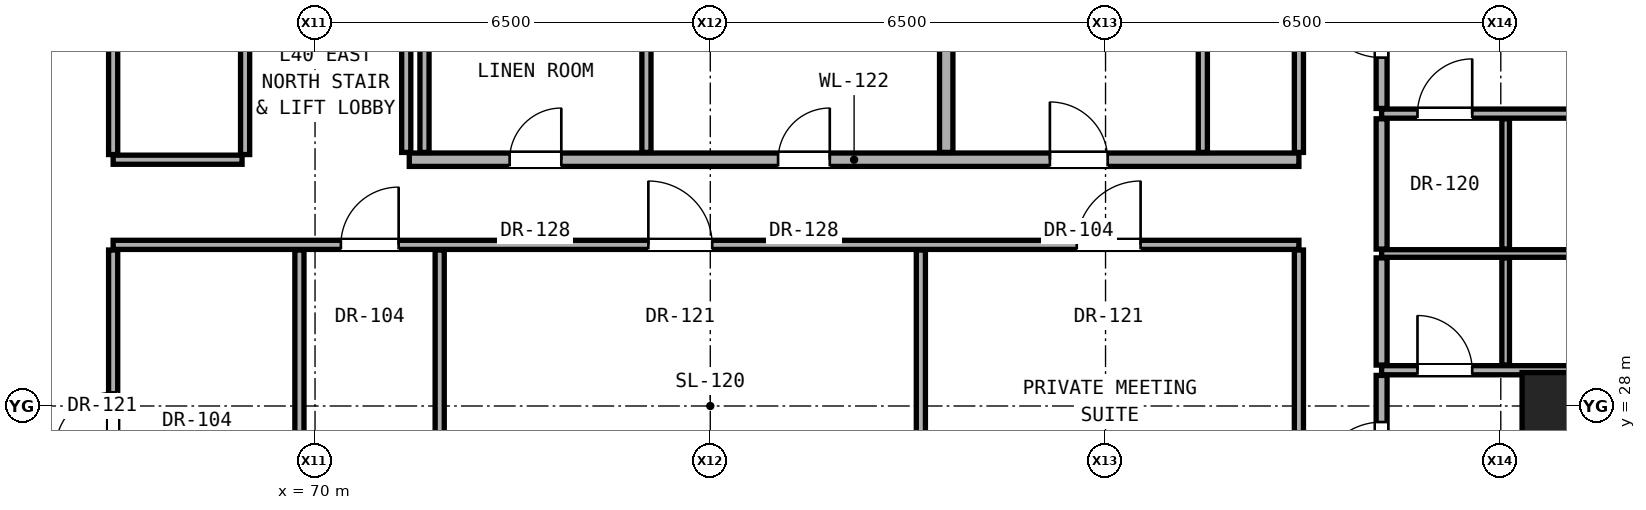
"""IFC4 building model, lengths in metres.
Left out: names, types, materials, properties, quantities, classifications, styles, units other than length and angle.
Written with IfcOpenShell. Run it as: python <this file> out.ifc"""

import sys

from ifc_helpers import new_model, si_unit, direction, frame, frame_2d, origin, origin_2d, place, context, subcontext, project, spatial, rectangle, hollow_rectangle, extrude, element, fill, save


model = new_model("IFC4")
c1 = context("Model", 3, precision=1e-05, world=origin(), true_north=direction((0.0, 1.0)))
c2 = subcontext(c1, "Body", "Model", "MODEL_VIEW")
j1 = project(units=[si_unit("LENGTHUNIT", "METRE"), si_unit("PLANEANGLEUNIT", "RADIAN")], contexts=[c1])
p1 = place(None, origin())
s1 = spatial("IfcSite", under=j1, at=p1, CompositionType="ELEMENT")
p2 = place(p1, origin())
s2 = spatial("IfcBuilding", under=s1, at=p2, CompositionType="ELEMENT")
p3 = place(p2, frame((0.0, 0.0, 141.2)))
s3 = spatial("IfcBuildingStorey", under=s2, at=p3, CompositionType="ELEMENT", Elevation=141.2)
p4 = place(p3, frame((90.4, 28.0, 0.0), z_axis=(0.0, 0.0, 1.0), x_axis=(1.0, 0.0, 0.0)))
e1 = element("IfcColumn", 1, at=p4, inside=s3, PredefinedType="COLUMN", context=c2, shape_type="SweptSolid", body=[
    extrude(hollow_rectangle(XDim=1.1, YDim=1.1, WallThickness=0.06, at=origin_2d()), origin(), (0.0, 0.0, 1.0), 3.3),
])
p5 = place(p3, frame((87.54, 28.588, 0.0), z_axis=(0.0, 0.0, 1.0), x_axis=(1.0, 0.0, 0.0)))
e2 = element("IfcWall", 2, at=p5, inside=s3, PredefinedType="PARTITIONING", context=c2, shape_type="SweptSolid", body=[
    extrude(rectangle(XDim=7.471, YDim=0.15, at=frame_2d((3.735, 0.0))), origin(), (0.0, 0.0, 1.0), 2.299),
])
p6 = place(p5, frame((4.26, 0.0, 0.0)))
e3 = element("IfcOpeningElement", 3, at=p6, cuts=e2, PredefinedType="OPENING", context=c2, shape_type="SweptSolid", body=[
    extrude(rectangle(XDim=0.95, YDim=2.15, at=frame_2d((0.475, 1.075))), frame((0.0, 0.085, 0.0), z_axis=(0.0, -1.0, 0.0), x_axis=(1.0, 0.0, 0.0)), (0.0, 0.0, 1.0), 0.17),
])
p7 = place(p5, frame((0.59, 0.0, 0.0)))
e4 = element("IfcOpeningElement", 4, at=p7, cuts=e2, PredefinedType="OPENING", context=c2, shape_type="SweptSolid", body=[
    extrude(rectangle(XDim=0.9, YDim=2.1, at=frame_2d((0.45, 1.05))), frame((0.0, 0.085, 0.0), z_axis=(0.0, -1.0, 0.0), x_axis=(1.0, 0.0, 0.0)), (0.0, 0.0, 1.0), 0.17),
])
p8 = place(p3, frame((66.68, 30.65, 0.0), z_axis=(0.0, 0.0, 1.0), x_axis=(1.0, 0.0, 0.0)))
e5 = element("IfcWall", 5, at=p8, inside=s3, PredefinedType="PARTITIONING", context=c2, shape_type="SweptSolid", body=[
    extrude(rectangle(XDim=19.5, YDim=0.15, at=frame_2d((9.75, 0.0))), origin(), (0.0, 0.0, 1.0), 2.216),
])
p9 = place(p8, frame((3.745, 0.0, 0.0)))
e6 = element("IfcOpeningElement", 6, at=p9, cuts=e5, PredefinedType="OPENING", context=c2, shape_type="SweptSolid", body=[
    extrude(rectangle(XDim=0.95, YDim=2.15, at=frame_2d((0.475, 1.075))), frame((0.0, 0.085, 0.0), z_axis=(0.0, -1.0, 0.0), x_axis=(1.0, 0.0, 0.0)), (0.0, 0.0, 1.0), 0.17),
])
p10 = place(p8, frame((8.802, 0.0, 0.0)))
e7 = element("IfcOpeningElement", 7, at=p10, cuts=e5, PredefinedType="OPENING", context=c2, shape_type="SweptSolid", body=[
    extrude(rectangle(XDim=1.05, YDim=2.2, at=frame_2d((0.525, 1.1))), frame((0.0, 0.085, 0.0), z_axis=(0.0, -1.0, 0.0), x_axis=(1.0, 0.0, 0.0)), (0.0, 0.0, 1.0), 0.17),
])
p11 = place(p8, frame((15.846, 0.0, 0.0)))
e8 = element("IfcOpeningElement", 8, at=p11, cuts=e5, PredefinedType="OPENING", context=c2, shape_type="SweptSolid", body=[
    extrude(rectangle(XDim=1.05, YDim=2.2, at=frame_2d((0.525, 1.1))), frame((0.0, 0.085, 0.0), z_axis=(0.0, -1.0, 0.0), x_axis=(1.0, 0.0, 0.0)), (0.0, 0.0, 1.0), 0.17),
])
p12 = place(p3, frame((87.54, 30.508, 0.0), z_axis=(0.0, 0.0, 1.0), x_axis=(1.0, 0.0, 0.0)))
e9 = element("IfcWall", 9, at=p12, inside=s3, PredefinedType="PARTITIONING", context=c2, shape_type="SweptSolid", body=[
    extrude(rectangle(XDim=7.471, YDim=0.125, at=frame_2d((3.735, 0.0))), origin(), (0.0, 0.0, 1.0), 2.299),
])
p13 = place(p3, frame((66.68, 32.05, 0.0), z_axis=(0.0, 0.0, 1.0), x_axis=(1.0, 0.0, 0.0)))
e10 = element("IfcWall", 10, at=p13, inside=s3, PredefinedType="PARTITIONING", context=c2, shape_type="SweptSolid", body=[
    extrude(rectangle(XDim=2.12, YDim=0.15, at=frame_2d((1.06, 0.0))), origin(), (0.0, 0.0, 1.0), 2.216),
])
p14 = place(p3, frame((71.55, 32.05, 0.0), z_axis=(0.0, 0.0, 1.0), x_axis=(1.0, 0.0, 0.0)))
e11 = element("IfcWall", 11, at=p14, inside=s3, PredefinedType="SOLIDWALL", context=c2, shape_type="SweptSolid", body=[
    extrude(rectangle(XDim=14.63, YDim=0.22, at=frame_2d((7.315, 0.0))), origin(), (0.0, 0.0, 1.0), 2.216),
])
p15 = place(p14, frame((6.065, 0.0, 0.0)))
e12 = element("IfcOpeningElement", 12, at=p15, cuts=e11, PredefinedType="OPENING", context=c2, shape_type="SweptSolid", body=[
    extrude(rectangle(XDim=0.85, YDim=2.01, at=frame_2d((0.425, 1.005))), frame((0.0, 0.12, 0.0), z_axis=(0.0, -1.0, 0.0), x_axis=(1.0, 0.0, 0.0)), (0.0, 0.0, 1.0), 0.24),
])
p16 = place(p14, frame((10.535, 0.0, 0.0)))
e13 = element("IfcOpeningElement", 13, at=p16, cuts=e11, PredefinedType="OPENING", context=c2, shape_type="SweptSolid", body=[
    extrude(rectangle(XDim=0.95, YDim=2.15, at=frame_2d((0.475, 1.075))), frame((0.0, 0.12, 0.0), z_axis=(0.0, -1.0, 0.0), x_axis=(1.0, 0.0, 0.0)), (0.0, 0.0, 1.0), 0.24),
])
p17 = place(p14, frame((1.65, 0.0, 0.0)))
e14 = element("IfcOpeningElement", 14, at=p17, cuts=e11, PredefinedType="OPENING", context=c2, shape_type="SweptSolid", body=[
    extrude(rectangle(XDim=0.85, YDim=2.01, at=frame_2d((0.425, 1.005))), frame((0.0, 0.12, 0.0), z_axis=(0.0, -1.0, 0.0), x_axis=(1.0, 0.0, 0.0)), (0.0, 0.0, 1.0), 0.24),
])
p18 = place(p3, frame((87.54, 32.808, 0.0), z_axis=(0.0, 0.0, 1.0), x_axis=(1.0, 0.0, 0.0)))
e15 = element("IfcWall", 15, at=p18, inside=s3, PredefinedType="PARTITIONING", context=c2, shape_type="SweptSolid", body=[
    extrude(rectangle(XDim=7.471, YDim=0.15, at=frame_2d((3.735, 0.0))), origin(), (0.0, 0.0, 1.0), 2.299),
])
p19 = place(p18, frame((4.26, 0.0, 0.0)))
e16 = element("IfcOpeningElement", 16, at=p19, cuts=e15, PredefinedType="OPENING", context=c2, shape_type="SweptSolid", body=[
    extrude(rectangle(XDim=0.95, YDim=2.15, at=frame_2d((0.475, 1.075))), frame((0.0, 0.085, 0.0), z_axis=(0.0, -1.0, 0.0), x_axis=(1.0, 0.0, 0.0)), (0.0, 0.0, 1.0), 0.17),
])
p20 = place(p18, frame((0.59, 0.0, 0.0)))
e17 = element("IfcOpeningElement", 17, at=p20, cuts=e15, PredefinedType="OPENING", context=c2, shape_type="SweptSolid", body=[
    extrude(rectangle(XDim=0.9, YDim=2.1, at=frame_2d((0.45, 1.05))), frame((0.0, 0.085, 0.0), z_axis=(0.0, -1.0, 0.0), x_axis=(1.0, 0.0, 0.0)), (0.0, 0.0, 1.0), 0.17),
])
p21 = place(p3, frame((66.68, 24.935, 0.0), z_axis=(0.0, 0.0, 1.0), x_axis=(0.0, 1.0, 0.0)))
e18 = element("IfcWall", 18, at=p21, inside=s3, PredefinedType="PARTITIONING", context=c2, shape_type="SweptSolid", body=[
    extrude(rectangle(XDim=5.63, YDim=0.15, at=frame_2d((2.815, 0.0))), origin(), (0.0, 0.0, 1.0), 2.376),
])
p22 = place(p21, frame((2.34, 0.0, 0.0)))
e19 = element("IfcOpeningElement", 19, at=p22, cuts=e18, PredefinedType="OPENING", context=c2, shape_type="SweptSolid", body=[
    extrude(rectangle(XDim=0.95, YDim=2.15, at=frame_2d((0.475, 1.075))), frame((0.0, 0.085, 0.0), z_axis=(0.0, -1.0, 0.0), x_axis=(1.0, 0.0, 0.0)), (0.0, 0.0, 1.0), 0.17),
])
p23 = place(p3, frame((66.68, 32.135, 0.0), z_axis=(0.0, 0.0, 1.0), x_axis=(0.0, 1.0, 0.0)))
e20 = element("IfcWall", 20, at=p23, inside=s3, PredefinedType="PARTITIONING", context=c2, shape_type="SweptSolid", body=[
    extrude(rectangle(XDim=3.48, YDim=0.15, at=frame_2d((1.74, 0.0))), origin(), (0.0, 0.0, 1.0), 2.472),
])
p24 = place(p3, frame((68.85, 32.135, 0.0), z_axis=(0.0, 0.0, 1.0), x_axis=(0.0, 1.0, 0.0)))
e21 = element("IfcWall", 21, at=p24, inside=s3, PredefinedType="PARTITIONING", context=c2, shape_type="SweptSolid", body=[
    extrude(rectangle(XDim=2.795, YDim=0.15, at=frame_2d((1.397, 0.0))), origin(), (0.0, 0.0, 1.0), 3.08),
])
p25 = place(p3, frame((69.743, 24.935, 0.0), z_axis=(0.0, 0.0, 1.0), x_axis=(0.0, 1.0, 0.0)))
e22 = element("IfcWall", 22, at=p25, inside=s3, PredefinedType="PARTITIONING", context=c2, shape_type="SweptSolid", body=[
    extrude(rectangle(XDim=5.63, YDim=0.15, at=frame_2d((2.815, 0.0))), origin(), (0.0, 0.0, 1.0), 2.216),
])
for number, where, z_axis, x_axis in (
    (23, (71.5, 32.17, 0.0), (0.0, 0.0, 1.0), (0.0, 1.0, 0.0)),
    (24, (71.8, 32.17, 0.0), (0.0, 0.0, 1.0), (0.0, 1.0, 0.0)),
):
    element("IfcWall", number, at=place(p3, frame(where, z_axis=z_axis, x_axis=x_axis)), inside=s3, PredefinedType="PARTITIONING", context=c2, shape_type="SweptSolid", body=[
        extrude(rectangle(XDim=2.76, YDim=0.15, at=frame_2d((1.38, 0.0))), origin(), (0.0, 0.0, 1.0), 3.08),
    ])
p26 = place(p3, frame((72.05, 26.17, 0.0), z_axis=(0.0, 0.0, 1.0), x_axis=(0.0, 1.0, 0.0)))
e25 = element("IfcWall", 25, at=p26, inside=s3, PredefinedType="PARTITIONING", context=c2, shape_type="SweptSolid", body=[
    extrude(rectangle(XDim=4.395, YDim=0.15, at=frame_2d((2.198, 0.0))), origin(), (0.0, 0.0, 1.0), 2.216),
])
p27 = place(p3, frame((75.45, 32.17, 0.0), z_axis=(0.0, 0.0, 1.0), x_axis=(0.0, 1.0, 0.0)))
e26 = element("IfcWall", 26, at=p27, inside=s3, PredefinedType="PARTITIONING", context=c2, shape_type="SweptSolid", body=[
    extrude(rectangle(XDim=2.76, YDim=0.15, at=frame_2d((1.38, 0.0))), origin(), (0.0, 0.0, 1.0), 3.08),
])
p28 = place(p3, frame((79.963, 26.17, 0.0), z_axis=(0.0, 0.0, 1.0), x_axis=(0.0, 1.0, 0.0)))
e27 = element("IfcWall", 27, at=p28, inside=s3, PredefinedType="PARTITIONING", context=c2, shape_type="SweptSolid", body=[
    extrude(rectangle(XDim=4.395, YDim=0.15, at=frame_2d((2.198, 0.0))), origin(), (0.0, 0.0, 1.0), 2.216),
])
p29 = place(p3, frame((80.38, 32.17, 0.0), z_axis=(0.0, 0.0, 1.0), x_axis=(0.0, 1.0, 0.0)))
e28 = element("IfcWall", 28, at=p29, inside=s3, PredefinedType="SOLIDWALL", context=c2, shape_type="SweptSolid", body=[
    extrude(rectangle(XDim=2.76, YDim=0.22, at=frame_2d((1.38, 0.0))), origin(), (0.0, 0.0, 1.0), 3.08),
])
p30 = place(p3, frame((84.6, 32.17, 0.0), z_axis=(0.0, 0.0, 1.0), x_axis=(0.0, 1.0, 0.0)))
e29 = element("IfcWall", 29, at=p30, inside=s3, PredefinedType="PARTITIONING", context=c2, shape_type="SweptSolid", body=[
    extrude(rectangle(XDim=2.76, YDim=0.15, at=frame_2d((1.38, 0.0))), origin(), (0.0, 0.0, 1.0), 3.08),
])
p31 = place(p3, frame((86.18, 26.17, 0.0), z_axis=(0.0, 0.0, 1.0), x_axis=(0.0, 1.0, 0.0)))
e30 = element("IfcWall", 30, at=p31, inside=s3, PredefinedType="PARTITIONING", context=c2, shape_type="SweptSolid", body=[
    extrude(rectangle(XDim=4.395, YDim=0.15, at=frame_2d((2.198, 0.0))), origin(), (0.0, 0.0, 1.0), 2.376),
])
p32 = place(p3, frame((86.18, 32.17, 0.0), z_axis=(0.0, 0.0, 1.0), x_axis=(0.0, 1.0, 0.0)))
e31 = element("IfcWall", 31, at=p32, inside=s3, PredefinedType="PARTITIONING", context=c2, shape_type="SweptSolid", body=[
    extrude(rectangle(XDim=3.445, YDim=0.15, at=frame_2d((1.723, 0.0))), origin(), (0.0, 0.0, 1.0), 2.472),
])
p33 = place(p3, frame((87.54, 25.919, 0.0), z_axis=(0.0, 0.0, 1.0), x_axis=(0.0, 1.0, 0.0)))
e32 = element("IfcWall", 32, at=p33, inside=s3, PredefinedType="PARTITIONING", context=c2, shape_type="SweptSolid", body=[
    extrude(rectangle(XDim=2.584, YDim=0.18, at=frame_2d((1.292, 0.0))), origin(), (0.0, 0.0, 1.0), 2.376),
])
p34 = place(p33, frame((0.767, 0.0, 0.0)))
e33 = element("IfcOpeningElement", 33, at=p34, cuts=e32, PredefinedType="OPENING", context=c2, shape_type="SweptSolid", body=[
    extrude(rectangle(XDim=1.05, YDim=2.2, at=frame_2d((0.525, 1.1))), frame((0.0, 0.1, 0.0), z_axis=(0.0, -1.0, 0.0), x_axis=(1.0, 0.0, 0.0)), (0.0, 0.0, 1.0), 0.2),
])
p35 = place(p3, frame((87.54, 28.673, 0.0), z_axis=(0.0, 0.0, 1.0), x_axis=(0.0, 1.0, 0.0)))
e34 = element("IfcWall", 34, at=p35, inside=s3, PredefinedType="PARTITIONING", context=c2, shape_type="SweptSolid", body=[
    extrude(rectangle(XDim=1.762, YDim=0.18, at=frame_2d((0.881, 0.0))), origin(), (0.0, 0.0, 1.0), 3.08),
])
p36 = place(p3, frame((87.54, 30.581, 0.0), z_axis=(0.0, 0.0, 1.0), x_axis=(0.0, 1.0, 0.0)))
e35 = element("IfcWall", 35, at=p36, inside=s3, PredefinedType="PARTITIONING", context=c2, shape_type="SweptSolid", body=[
    extrude(rectangle(XDim=2.142, YDim=0.18, at=frame_2d((1.071, 0.0))), origin(), (0.0, 0.0, 1.0), 3.08),
])
p37 = place(p3, frame((87.54, 32.893, 0.0), z_axis=(0.0, 0.0, 1.0), x_axis=(0.0, 1.0, 0.0)))
e36 = element("IfcWall", 36, at=p37, inside=s3, PredefinedType="PARTITIONING", context=c2, shape_type="SweptSolid", body=[
    extrude(rectangle(XDim=2.722, YDim=0.18, at=frame_2d((1.361, 0.0))), origin(), (0.0, 0.0, 1.0), 2.472),
])
p38 = place(p37, frame((0.836, 0.0, 0.0)))
e37 = element("IfcOpeningElement", 37, at=p38, cuts=e36, PredefinedType="OPENING", context=c2, shape_type="SweptSolid", body=[
    extrude(rectangle(XDim=1.05, YDim=2.2, at=frame_2d((0.525, 1.1))), frame((0.0, 0.1, 0.0), z_axis=(0.0, -1.0, 0.0), x_axis=(1.0, 0.0, 0.0)), (0.0, 0.0, 1.0), 0.2),
])
p39 = place(p3, frame((89.58, 28.673, 0.0), z_axis=(0.0, 0.0, 1.0), x_axis=(0.0, 1.0, 0.0)))
e38 = element("IfcWall", 38, at=p39, inside=s3, PredefinedType="PARTITIONING", context=c2, shape_type="SweptSolid", body=[
    extrude(rectangle(XDim=1.762, YDim=0.125, at=frame_2d((0.881, 0.0))), origin(), (0.0, 0.0, 1.0), 3.08),
])
p40 = place(p3, frame((89.58, 30.581, 0.0), z_axis=(0.0, 0.0, 1.0), x_axis=(0.0, 1.0, 0.0)))
e39 = element("IfcWall", 39, at=p40, inside=s3, PredefinedType="PARTITIONING", context=c2, shape_type="SweptSolid", body=[
    extrude(rectangle(XDim=2.142, YDim=0.125, at=frame_2d((1.071, 0.0))), origin(), (0.0, 0.0, 1.0), 3.08),
])
p41 = place(p15, origin())
e40 = element("IfcDoor", 40, at=p41, inside=s3, OperationType="SINGLE_SWING_RIGHT", PredefinedType="DOOR", context=c2, shape_type="SweptSolid", body=[
    extrude(rectangle(XDim=0.85, YDim=2.01, at=frame_2d((0.425, 1.005))), frame((0.0, 0.025, 0.0), z_axis=(0.0, -1.0, 0.0), x_axis=(1.0, 0.0, 0.0)), (0.0, 0.0, 1.0), 0.05),
])
fill(e12, e40)
p42 = place(p16, origin())
e41 = element("IfcDoor", 41, at=p42, inside=s3, OperationType="SINGLE_SWING_LEFT", PredefinedType="DOOR", context=c2, shape_type="SweptSolid", body=[
    extrude(rectangle(XDim=0.95, YDim=2.15, at=frame_2d((0.475, 1.075))), frame((0.0, 0.025, 0.0), z_axis=(0.0, -1.0, 0.0), x_axis=(1.0, 0.0, 0.0)), (0.0, 0.0, 1.0), 0.05),
])
fill(e13, e41)
p43 = place(p17, origin())
e42 = element("IfcDoor", 42, at=p43, inside=s3, OperationType="SINGLE_SWING_RIGHT", PredefinedType="DOOR", context=c2, shape_type="SweptSolid", body=[
    extrude(rectangle(XDim=0.85, YDim=2.01, at=frame_2d((0.425, 1.005))), frame((0.0, 0.025, 0.0), z_axis=(0.0, -1.0, 0.0), x_axis=(1.0, 0.0, 0.0)), (0.0, 0.0, 1.0), 0.05),
])
fill(e14, e42)
p44 = place(p34, origin())
e43 = element("IfcDoor", 43, at=p44, inside=s3, OperationType="SINGLE_SWING_LEFT", PredefinedType="DOOR", context=c2, shape_type="SweptSolid", body=[
    extrude(rectangle(XDim=1.05, YDim=2.2, at=frame_2d((0.525, 1.1))), frame((0.0, 0.025, 0.0), z_axis=(0.0, -1.0, 0.0), x_axis=(1.0, 0.0, 0.0)), (0.0, 0.0, 1.0), 0.05),
])
fill(e33, e43)
p45 = place(p7, origin())
e44 = element("IfcDoor", 44, at=p45, inside=s3, OperationType="SINGLE_SWING_LEFT", PredefinedType="DOOR", context=c2, shape_type="SweptSolid", body=[
    extrude(rectangle(XDim=0.9, YDim=2.1, at=frame_2d((0.45, 1.05))), frame((0.0, 0.025, 0.0), z_axis=(0.0, -1.0, 0.0), x_axis=(1.0, 0.0, 0.0)), (0.0, 0.0, 1.0), 0.05),
])
fill(e4, e44)
p46 = place(p38, origin())
e45 = element("IfcDoor", 45, at=p46, inside=s3, OperationType="SINGLE_SWING_RIGHT", PredefinedType="DOOR", context=c2, shape_type="SweptSolid", body=[
    extrude(rectangle(XDim=1.05, YDim=2.2, at=frame_2d((0.525, 1.1))), frame((0.0, 0.025, 0.0), z_axis=(0.0, -1.0, 0.0), x_axis=(1.0, 0.0, 0.0)), (0.0, 0.0, 1.0), 0.05),
])
fill(e37, e45)
p47 = place(p20, origin())
e46 = element("IfcDoor", 46, at=p47, inside=s3, OperationType="SINGLE_SWING_RIGHT", PredefinedType="DOOR", context=c2, shape_type="SweptSolid", body=[
    extrude(rectangle(XDim=0.9, YDim=2.1, at=frame_2d((0.45, 1.05))), frame((0.0, 0.025, 0.0), z_axis=(0.0, -1.0, 0.0), x_axis=(1.0, 0.0, 0.0)), (0.0, 0.0, 1.0), 0.05),
])
fill(e17, e46)
p48 = place(p22, origin())
e47 = element("IfcDoor", 47, at=p48, inside=s3, OperationType="SINGLE_SWING_LEFT", PredefinedType="DOOR", context=c2, shape_type="SweptSolid", body=[
    extrude(rectangle(XDim=0.95, YDim=2.15, at=frame_2d((0.475, 1.075))), frame((0.0, 0.025, 0.0), z_axis=(0.0, -1.0, 0.0), x_axis=(1.0, 0.0, 0.0)), (0.0, 0.0, 1.0), 0.05),
])
fill(e19, e47)
p49 = place(p9, origin())
e48 = element("IfcDoor", 48, at=p49, inside=s3, OperationType="SINGLE_SWING_RIGHT", PredefinedType="DOOR", context=c2, shape_type="SweptSolid", body=[
    extrude(rectangle(XDim=0.95, YDim=2.15, at=frame_2d((0.475, 1.075))), frame((0.0, 0.025, 0.0), z_axis=(0.0, -1.0, 0.0), x_axis=(1.0, 0.0, 0.0)), (0.0, 0.0, 1.0), 0.05),
])
fill(e6, e48)
p50 = place(p10, origin())
e49 = element("IfcDoor", 49, at=p50, inside=s3, OperationType="SINGLE_SWING_LEFT", PredefinedType="DOOR", context=c2, shape_type="SweptSolid", body=[
    extrude(rectangle(XDim=1.05, YDim=2.2, at=frame_2d((0.525, 1.1))), frame((0.0, 0.025, 0.0), z_axis=(0.0, -1.0, 0.0), x_axis=(1.0, 0.0, 0.0)), (0.0, 0.0, 1.0), 0.05),
])
fill(e7, e49)
p51 = place(p11, origin())
e50 = element("IfcDoor", 50, at=p51, inside=s3, OperationType="SINGLE_SWING_RIGHT", PredefinedType="DOOR", context=c2, shape_type="SweptSolid", body=[
    extrude(rectangle(XDim=1.05, YDim=2.2, at=frame_2d((0.525, 1.1))), frame((0.0, 0.025, 0.0), z_axis=(0.0, -1.0, 0.0), x_axis=(1.0, 0.0, 0.0)), (0.0, 0.0, 1.0), 0.05),
])
fill(e8, e50)
save(model, sys.argv[1])
